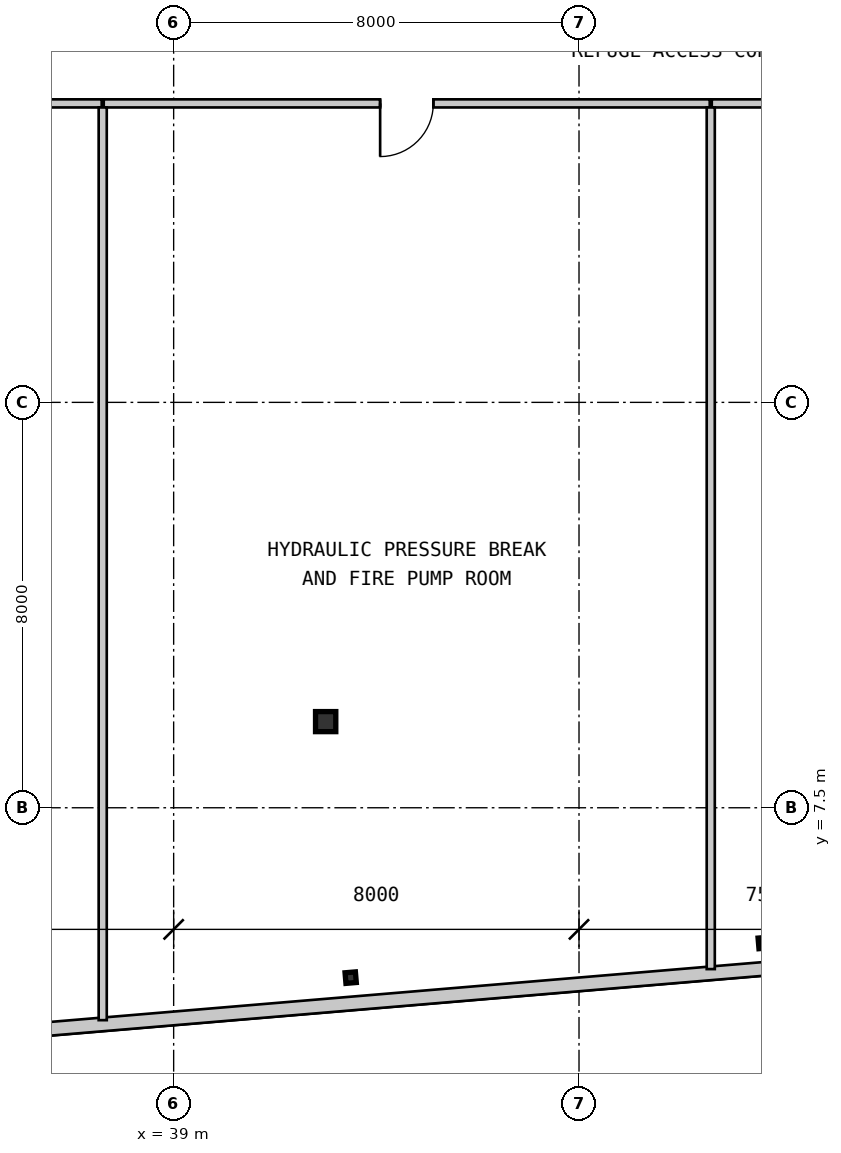
"""IFC4 building model, lengths in metres.
Left out: names, types, materials, properties, quantities, classifications, styles, units other than length and angle.
Written with IfcOpenShell. Run it as: python <this file> out.ifc"""

import sys

from ifc_helpers import new_model, si_unit, direction, frame, frame_2d, origin, origin_2d, place, context, subcontext, project, spatial, rectangle, i_section, extrude, source, transform, mapped, element, fill, save


model = new_model("IFC4")
c1 = context("Model", 3, precision=1e-05, world=origin(), true_north=direction((0.0, 1.0)))
c2 = subcontext(c1, "Body", "Model", "MODEL_VIEW")
j1 = project(units=[si_unit("LENGTHUNIT", "METRE"), si_unit("PLANEANGLEUNIT", "RADIAN")], contexts=[c1])
p1 = place(None, origin())
s1 = spatial("IfcSite", under=j1, at=p1, CompositionType="ELEMENT")
p2 = place(p1, origin())
s2 = spatial("IfcBuilding", under=s1, at=p2, CompositionType="ELEMENT")
p3 = place(p2, frame((0.0, 0.0, 207.2)))
s3 = spatial("IfcBuildingStorey", under=s2, at=p3, CompositionType="ELEMENT", Elevation=207.2)
m1 = source(origin(), c2, "Body", "SweptSolid", [
    extrude(i_section(OverallWidth=0.4, OverallDepth=0.396, WebThickness=0.022, FlangeThickness=0.034, at=origin_2d()), origin(), (0.0, 0.0, 1.0), 4.2),
])
p4 = place(p3, frame((42.0, 9.2, 0.0), z_axis=(0.0, 0.0, 1.0), x_axis=(1.0, 0.0, 0.0)))
e1 = element("IfcColumn", 1, at=p4, inside=s3, PredefinedType="COLUMN", context=c2, shape_type="MappedRepresentation", body=[
    mapped(m1, transform((0.0, 0.0, 0.0), scale=1.0)),
])
m2 = source(origin(), c2, "Body", "SweptSolid", [
    extrude(i_section(OverallWidth=0.205, OverallDepth=0.21, WebThickness=0.009, FlangeThickness=0.014, at=origin_2d()), origin(), (0.0, 0.0, 1.0), 4.2),
])
for number, where, z_axis, x_axis in (
    (2, (42.494, 4.147, 0.0), (0.0, 0.0, 1.0), (0.996, 0.084, 0.0)),
    (3, (50.645, 4.832, 0.0), (0.0, 0.0, 1.0), (0.996, 0.084, 0.0)),
):
    element("IfcColumn", number, at=place(p3, frame(where, z_axis=z_axis, x_axis=x_axis)), inside=s3, PredefinedType="COLUMN", context=c2, shape_type="MappedRepresentation", body=[
        mapped(m2, transform((0.0, 0.0, 0.0), scale=1.0)),
    ])
m3 = source(origin(), c2, "Body", "SweptSolid", [
    extrude(rectangle(XDim=37.323, YDim=0.27, at=frame_2d((18.661, 0.0))), origin(), (0.0, 0.0, 1.0), 3.78),
])
p5 = place(p3, frame((17.285, 1.519, 0.0), z_axis=(0.0, 0.0, 1.0), x_axis=(0.99649291123, 0.083677224315, 0.0)))
e4 = element("IfcWall", 4, at=p5, inside=s3, PredefinedType="SOLIDWALL", context=c2, shape_type="MappedRepresentation", body=[
    mapped(m3, transform((0.0, 0.0, 0.0), scale=1.0)),
])
m4 = source(origin(), c2, "Body", "SweptSolid", [
    extrude(rectangle(XDim=11.96, YDim=0.16, at=frame_2d((5.98, 0.0))), origin(), (0.0, 0.0, 1.0), 3.78),
])
p6 = place(p3, frame((37.58, 21.4, 0.0), z_axis=(0.0, 0.0, 1.0), x_axis=(-1.0, 0.0, 0.0)))
e5 = element("IfcWall", 5, at=p6, inside=s3, PredefinedType="PARTITIONING", context=c2, shape_type="MappedRepresentation", body=[
    mapped(m4, transform((0.0, 0.0, 0.0), scale=1.0)),
])
m5 = source(origin(), c2, "Body", "SweptSolid", [
    extrude(rectangle(XDim=1.05, YDim=2.1, at=frame_2d((0.525, 1.05))), frame((0.0, 0.09, 0.0), z_axis=(0.0, -1.0, 0.0), x_axis=(1.0, 0.0, 0.0)), (0.0, 0.0, 1.0), 0.18),
])
p7 = place(p6, frame((5.455, 0.0, 0.0)))
e6 = element("IfcOpeningElement", 6, at=p7, cuts=e5, PredefinedType="OPENING", context=c2, shape_type="MappedRepresentation", body=[
    mapped(m5, transform((0.0, 0.0, 0.0), scale=1.0)),
])
p8 = place(p3, frame((49.58, 21.4, 0.0), z_axis=(0.0, 0.0, 1.0), x_axis=(-1.0, 0.0, 0.0)))
e7 = element("IfcWall", 7, at=p8, inside=s3, PredefinedType="PARTITIONING", context=c2, shape_type="MappedRepresentation", body=[
    mapped(m4, transform((0.0, 0.0, 0.0), scale=1.0)),
])
p9 = place(p8, frame((5.455, 0.0, 0.0)))
e8 = element("IfcOpeningElement", 8, at=p9, cuts=e7, PredefinedType="OPENING", context=c2, shape_type="MappedRepresentation", body=[
    mapped(m5, transform((0.0, 0.0, 0.0), scale=1.0)),
])
m6 = source(origin(), c2, "Body", "SweptSolid", [
    extrude(rectangle(XDim=8.3, YDim=0.16, at=frame_2d((4.15, 0.0))), origin(), (0.0, 0.0, 1.0), 3.78),
])
p10 = place(p3, frame((57.92, 21.4, 0.0), z_axis=(0.0, 0.0, 1.0), x_axis=(-1.0, 0.0, 0.0)))
e9 = element("IfcWall", 9, at=p10, inside=s3, PredefinedType="PARTITIONING", context=c2, shape_type="MappedRepresentation", body=[
    mapped(m6, transform((0.0, 0.0, 0.0), scale=1.0)),
])
p11 = place(p10, frame((3.625, 0.0, 0.0)))
e10 = element("IfcOpeningElement", 10, at=p11, cuts=e9, PredefinedType="OPENING", context=c2, shape_type="MappedRepresentation", body=[
    mapped(m5, transform((0.0, 0.0, 0.0), scale=1.0)),
])
m7 = source(origin(), c2, "Body", "SweptSolid", [
    extrude(rectangle(XDim=18.012, YDim=0.16, at=frame_2d((9.006, 0.0))), origin(), (0.0, 0.0, 1.0), 3.78),
])
p12 = place(p3, frame((37.6, 21.32, 0.0), z_axis=(0.0, 0.0, 1.0), x_axis=(0.0, -1.0, 0.0)))
e11 = element("IfcWall", 11, at=p12, inside=s3, PredefinedType="PARTITIONING", context=c2, shape_type="MappedRepresentation", body=[
    mapped(m7, transform((0.0, 0.0, 0.0), scale=1.0)),
])
m8 = source(origin(), c2, "Body", "SweptSolid", [
    extrude(rectangle(XDim=17.004, YDim=0.16, at=frame_2d((8.502, 0.0))), origin(), (0.0, 0.0, 1.0), 3.78),
])
p13 = place(p3, frame((49.6, 21.32, 0.0), z_axis=(0.0, 0.0, 1.0), x_axis=(0.0, -1.0, 0.0)))
e12 = element("IfcWall", 12, at=p13, inside=s3, PredefinedType="PARTITIONING", context=c2, shape_type="MappedRepresentation", body=[
    mapped(m8, transform((0.0, 0.0, 0.0), scale=1.0)),
])
m9 = source(origin(), c2, "Body", "SweptSolid", [
    extrude(rectangle(XDim=1.05, YDim=2.1, at=frame_2d((0.525, 1.05))), frame((0.0, 0.025, 0.0), z_axis=(0.0, -1.0, 0.0), x_axis=(1.0, 0.0, 0.0)), (0.0, 0.0, 1.0), 0.05),
])
p14 = place(p9, origin())
e13 = element("IfcDoor", 13, at=p14, inside=s3, OperationType="SINGLE_SWING_RIGHT", PredefinedType="DOOR", context=c2, shape_type="MappedRepresentation", body=[
    mapped(m9, transform((0.0, 0.0, 0.0), scale=1.0)),
])
fill(e8, e13)
save(model, sys.argv[1])
